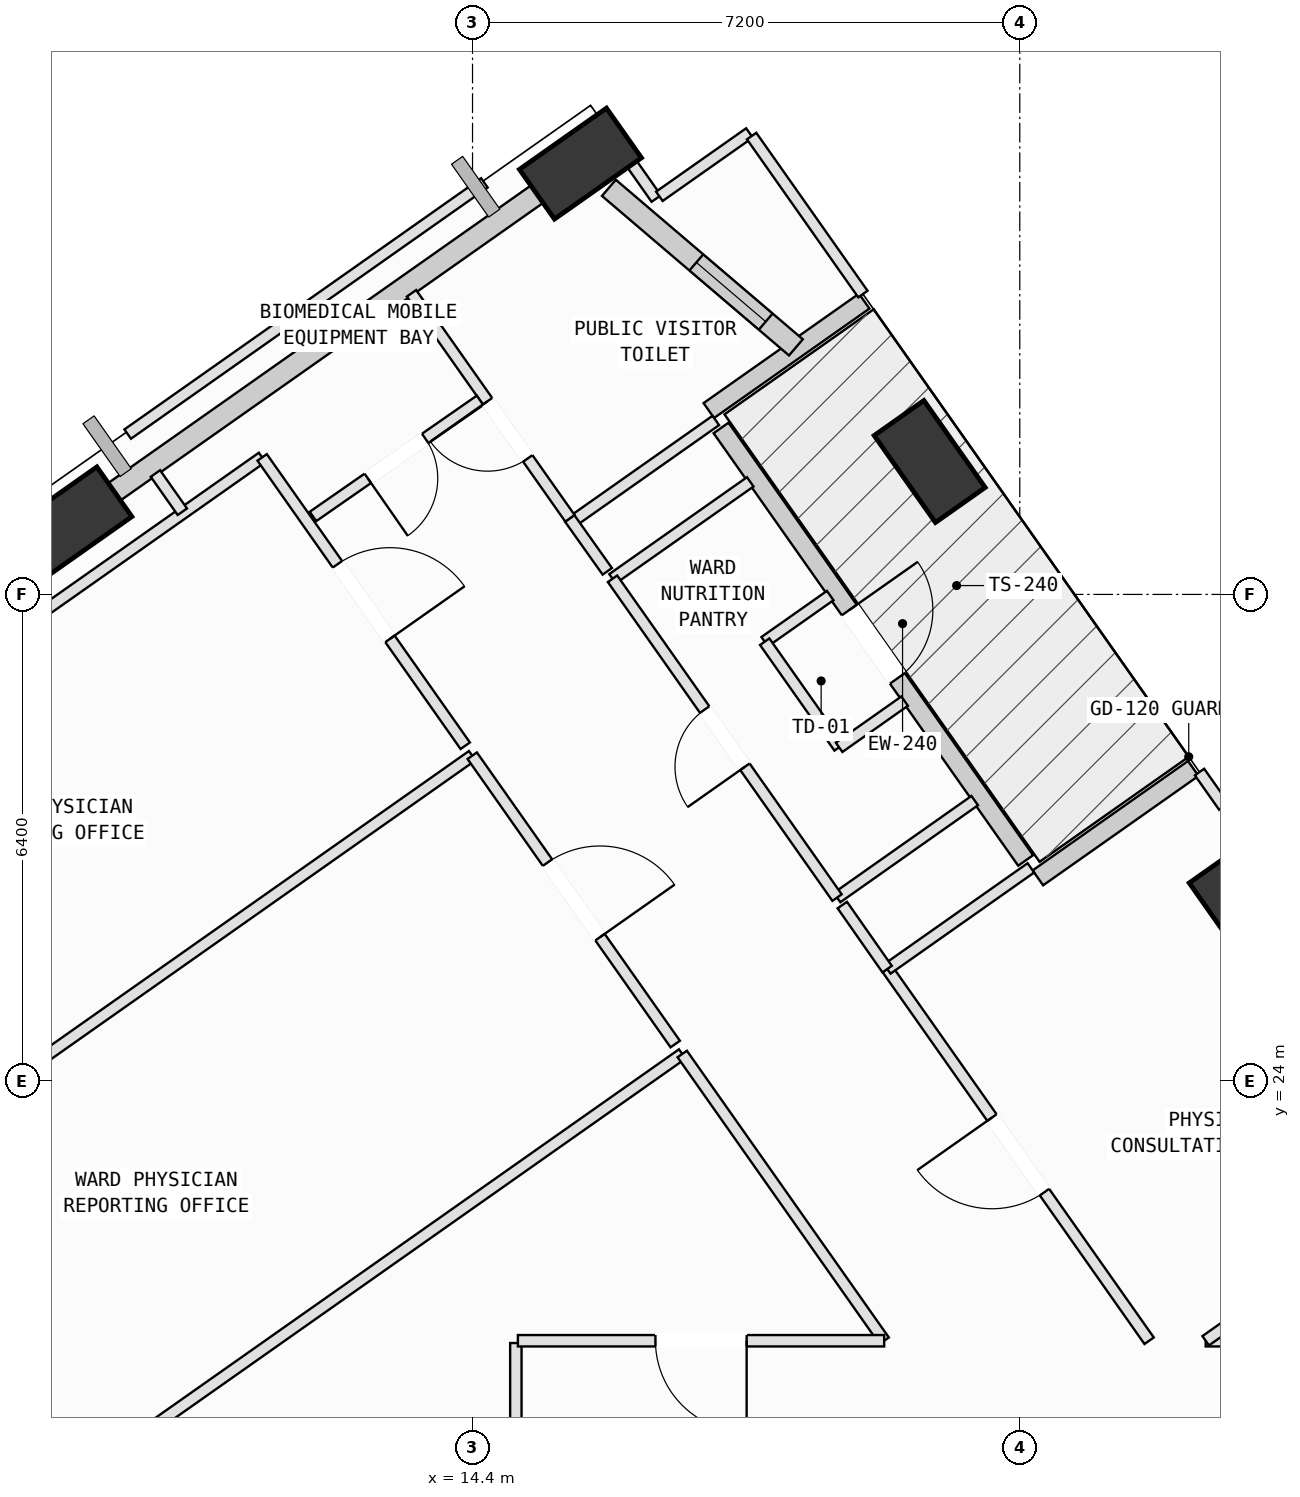
"""IFC4 building model, lengths in metres.
Left out: names, types, materials, properties, quantities, classifications, styles, units other than length and angle.
Written with IfcOpenShell. Run it as: python <this file> out.ifc"""

import sys

from ifc_helpers import new_model, si_unit, direction, frame, frame_2d, origin, origin_2d, place, context, subcontext, project, spatial, rectangle, extrude, element, fill, save


model = new_model("IFC4")
c1 = context("Model", 3, precision=1e-05, world=origin(), true_north=direction((0.0, 1.0)))
c2 = subcontext(c1, "Body", "Model", "MODEL_VIEW")
j1 = project(units=[si_unit("LENGTHUNIT", "METRE"), si_unit("PLANEANGLEUNIT", "RADIAN")], contexts=[c1])
p1 = place(None, origin())
s1 = spatial("IfcSite", under=j1, at=p1, CompositionType="ELEMENT")
p2 = place(p1, origin())
s2 = spatial("IfcBuilding", under=s1, at=p2, CompositionType="ELEMENT")
p3 = place(p2, frame((0.0, 0.0, 173.8)))
s3 = spatial("IfcBuildingStorey", under=s2, at=p3, CompositionType="ELEMENT", Elevation=173.8)
p4 = place(p3, frame((24.56, 26.262, 0.002), z_axis=(-0.005738432057, -0.037482949817, 0.999280790804), x_axis=(-0.445441829309, 0.894773866019, 0.031004925272)))
e1 = element("IfcColumn", 1, at=p4, inside=s3, PredefinedType="COLUMN", context=c2, shape_type="SweptSolid", body=[
    extrude(rectangle(XDim=1.4, YDim=0.8, at=origin_2d()), origin(), (0.0, 0.0, 1.0), 3.999),
])
p5 = place(p3, frame((20.415, 32.149, 0.002), z_axis=(-0.029937163226, -0.054813665459, 0.998047708447), x_axis=(-0.114112157003, 0.992154506101, 0.051067128835)))
e2 = element("IfcColumn", 2, at=p5, inside=s3, PredefinedType="COLUMN", context=c2, shape_type="SweptSolid", body=[
    extrude(rectangle(XDim=1.4, YDim=0.8, at=origin_2d()), origin(), (0.0, 0.0, 1.0), 4.004),
])
p6 = place(p3, frame((15.82, 36.069, 0.002), z_axis=(-0.045888334472, -0.073823010231, 0.996215049033), x_axis=(0.997206534803, 0.055450999468, 0.050043117453)))
e3 = element("IfcColumn", 3, at=p6, inside=s3, PredefinedType="COLUMN", context=c2, shape_type="SweptSolid", body=[
    extrude(rectangle(XDim=1.4, YDim=0.8, at=origin_2d()), origin(), (0.0, 0.0, 1.0), 4.011),
])
p7 = place(p3, frame((9.115, 31.348, 0.002), z_axis=(-0.026186113544, -0.101159812183, 0.99452550488), x_axis=(0.935042033919, 0.349395563353, 0.060159247944)))
e4 = element("IfcColumn", 4, at=p7, inside=s3, PredefinedType="COLUMN", context=c2, shape_type="SweptSolid", body=[
    extrude(rectangle(XDim=1.4, YDim=0.8, at=origin_2d()), origin(), (0.0, 0.0, 1.0), 4.018),
])
p8 = place(p3, frame((17.67, 32.59, 0.0), z_axis=(0.0, 0.0, 1.0), x_axis=(0.57573667461, -0.817635176292, 0.0)))
e5 = element("IfcWall", 5, at=p8, inside=s3, PredefinedType="SOLIDWALL", context=c2, shape_type="SweptSolid", body=[
    extrude(rectangle(XDim=6.96, YDim=0.24, at=frame_2d((3.48, 0.0))), origin(), (0.0, 0.0, 1.0), 3.265),
])
p9 = place(p8, frame((2.93, 0.0, 0.0)))
e6 = element("IfcOpeningElement", 6, at=p9, cuts=e5, PredefinedType="OPENING", context=c2, shape_type="SweptSolid", body=[
    extrude(rectangle(XDim=1.1, YDim=2.15, at=frame_2d((0.55, 1.075))), frame((0.0, 0.13, 0.0), z_axis=(0.0, -1.0, 0.0), x_axis=(1.0, 0.0, 0.0)), (0.0, 0.0, 1.0), 0.26),
])
for number, where, z_axis, x_axis in (
    (7, (21.838, 26.671, 0.0), (0.0, 0.0, 1.0), (0.818, 0.576, 0.0)),
    (8, (19.553, 34.259, 0.0), (0.0, 0.0, 1.0), (-0.818, -0.576, 0.0)),
):
    element("IfcWall", number, at=place(p3, frame(where, z_axis=z_axis, x_axis=x_axis)), inside=s3, PredefinedType="SOLIDWALL", context=c2, shape_type="SweptSolid", body=[
        extrude(rectangle(XDim=2.5, YDim=0.24, at=frame_2d((1.25, 0.0))), origin(), (0.0, 0.0, 1.0), 3.265),
    ])
p10 = place(p3, frame((16.194, 35.75, 0.0), z_axis=(0.0, 0.0, 1.0), x_axis=(0.760757212312, -0.649036565931, 0.0)))
e9 = element("IfcWall", 9, at=p10, inside=s3, PredefinedType="SOLIDWALL", context=c2, shape_type="SweptSolid", body=[
    extrude(rectangle(XDim=3.234, YDim=0.28, at=frame_2d((1.617, 0.0))), origin(), (0.0, 0.0, 1.0), 3.245),
])
p11 = place(p10, frame((1.512, 0.0, 0.75)))
e10 = element("IfcOpeningElement", 10, at=p11, cuts=e9, PredefinedType="OPENING", context=c2, shape_type="SweptSolid", body=[
    extrude(rectangle(XDim=1.2, YDim=1.75, at=frame_2d((0.6, 0.875))), frame((0.0, 0.15, 0.0), z_axis=(0.0, -1.0, 0.0), x_axis=(1.0, 0.0, 0.0)), (0.0, 0.0, 1.0), 0.3),
])
p12 = place(p3, frame((9.375, 31.531, 0.0), z_axis=(0.0, 0.0, 1.0), x_axis=(0.817661605139, 0.575699139726, 0.0)))
e11 = element("IfcWall", 11, at=p12, inside=s3, PredefinedType="SOLIDWALL", context=c2, shape_type="SweptSolid", body=[
    extrude(rectangle(XDim=7.23, YDim=0.28, at=frame_2d((3.615, 0.0))), origin(), (0.0, 0.0, 1.0), 3.265),
])
p13 = place(p3, frame((14.97, 20.55, 0.0), z_axis=(0.0, 0.0, 1.0), x_axis=(0.0, -1.0, 0.0)))
e12 = element("IfcWall", 12, at=p13, inside=s3, PredefinedType="PARTITIONING", context=c2, shape_type="SweptSolid", body=[
    extrude(rectangle(XDim=2.32, YDim=0.15, at=frame_2d((1.16, 0.0))), origin(), (0.0, 0.0, 1.0), 3.78),
])
p14 = place(p3, frame((6.01, 16.504, 0.0), z_axis=(0.0, 0.0, 1.0), x_axis=(0.817682801661, 0.575669033272, 0.0)))
e13 = element("IfcWall", 13, at=p14, inside=s3, PredefinedType="PARTITIONING", context=c2, shape_type="SweptSolid", body=[
    extrude(rectangle(XDim=13.635, YDim=0.15, at=frame_2d((6.817, 0.0))), origin(), (0.0, 0.0, 1.0), 3.78),
])
p15 = place(p3, frame((17.159, 24.353, 0.0), z_axis=(0.0, 0.0, 1.0), x_axis=(0.575775132448, -0.817608094905, 0.0)))
e14 = element("IfcWall", 14, at=p15, inside=s3, PredefinedType="PARTITIONING", context=c2, shape_type="SweptSolid", body=[
    extrude(rectangle(XDim=4.615, YDim=0.15, at=frame_2d((2.307, 0.0))), origin(), (0.0, 0.0, 1.0), 3.78),
])
p16 = place(p3, frame((19.816, 20.58, 0.0), z_axis=(0.0, 0.0, 1.0), x_axis=(-1.0, 0.0, 0.0)))
e15 = element("IfcWall", 15, at=p16, inside=s3, PredefinedType="PARTITIONING", context=c2, shape_type="SweptSolid", body=[
    extrude(rectangle(XDim=4.819, YDim=0.15, at=frame_2d((2.409, 0.0))), origin(), (0.0, 0.0, 1.0), 3.78),
])
p17 = place(p16, frame((1.81, 0.0, 0.0)))
e16 = element("IfcOpeningElement", 16, at=p17, cuts=e15, PredefinedType="OPENING", context=c2, shape_type="SweptSolid", body=[
    extrude(rectangle(XDim=1.2, YDim=2.15, at=frame_2d((0.6, 1.075))), frame((0.0, 0.085, 0.0), z_axis=(0.0, -1.0, 0.0), x_axis=(1.0, 0.0, 0.0)), (0.0, 0.0, 1.0), 0.17),
])
p18 = place(p3, frame((3.247, 20.428, 0.0), z_axis=(0.0, 0.0, 1.0), x_axis=(0.817649087701, 0.575716917749, 0.0)))
e17 = element("IfcWall", 17, at=p18, inside=s3, PredefinedType="PARTITIONING", context=c2, shape_type="SweptSolid", body=[
    extrude(rectangle(XDim=13.635, YDim=0.15, at=frame_2d((6.818, 0.0))), origin(), (0.0, 0.0, 1.0), 3.78),
])
p19 = place(p3, frame((14.396, 28.278, 0.0), z_axis=(0.0, 0.0, 1.0), x_axis=(0.575625036634, -0.817713774618, 0.0)))
e18 = element("IfcWall", 18, at=p19, inside=s3, PredefinedType="PARTITIONING", context=c2, shape_type="SweptSolid", body=[
    extrude(rectangle(XDim=4.64, YDim=0.15, at=frame_2d((2.32, 0.0))), origin(), (0.0, 0.0, 1.0), 3.78),
])
p20 = place(p19, frame((1.72, 0.0, 0.0)))
e19 = element("IfcOpeningElement", 19, at=p20, cuts=e18, PredefinedType="OPENING", context=c2, shape_type="SweptSolid", body=[
    extrude(rectangle(XDim=1.2, YDim=2.15, at=frame_2d((0.6, 1.075))), frame((0.0, 0.085, 0.0), z_axis=(0.0, -1.0, 0.0), x_axis=(1.0, 0.0, 0.0)), (0.0, 0.0, 1.0), 0.17),
])
p21 = place(p3, frame((2.525, 25.79, 0.0), z_axis=(0.0, 0.0, 1.0), x_axis=(0.817633687165, 0.575738789394, 0.0)))
e20 = element("IfcWall", 20, at=p21, inside=s3, PredefinedType="PARTITIONING", context=c2, shape_type="SweptSolid", body=[
    extrude(rectangle(XDim=11.138, YDim=0.15, at=frame_2d((5.569, 0.0))), origin(), (0.0, 0.0, 1.0), 3.265),
])
p22 = place(p3, frame((11.632, 32.203, 0.0), z_axis=(0.0, 0.0, 1.0), x_axis=(0.575790507785, -0.817597267085, 0.0)))
e21 = element("IfcWall", 21, at=p22, inside=s3, PredefinedType="PARTITIONING", context=c2, shape_type="SweptSolid", body=[
    extrude(rectangle(XDim=4.64, YDim=0.15, at=frame_2d((2.32, 0.0))), origin(), (0.0, 0.0, 1.0), 3.78),
])
p23 = place(p22, frame((1.72, 0.0, 0.0)))
e22 = element("IfcOpeningElement", 22, at=p23, cuts=e21, PredefinedType="OPENING", context=c2, shape_type="SweptSolid", body=[
    extrude(rectangle(XDim=1.2, YDim=2.15, at=frame_2d((0.6, 1.075))), frame((0.0, 0.085, 0.0), z_axis=(0.0, -1.0, 0.0), x_axis=(1.0, 0.0, 0.0)), (0.0, 0.0, 1.0), 0.17),
])
p24 = place(p3, frame((28.421, 20.579, 0.0), z_axis=(0.0, 0.0, 1.0), x_axis=(-0.999999975088, 0.00022321428, 0.0)))
e23 = element("IfcWall", 23, at=p24, inside=s3, PredefinedType="PARTITIONING", context=c2, shape_type="SweptSolid", body=[
    extrude(rectangle(XDim=4.375, YDim=0.15, at=frame_2d((2.188, 0.0))), origin(), (0.0, 0.0, 1.0), 3.78),
])
p25 = place(p24, frame((1.688, 0.0, 0.0)))
e24 = element("IfcOpeningElement", 24, at=p25, cuts=e23, PredefinedType="OPENING", context=c2, shape_type="SweptSolid", body=[
    extrude(rectangle(XDim=1.0, YDim=2.12, at=frame_2d((0.5, 1.06))), frame((0.0, 0.085, 0.0), z_axis=(0.0, -1.0, 0.0), x_axis=(1.0, 0.0, 0.0)), (0.0, 0.0, 1.0), 0.17),
])
p26 = place(p3, frame((24.046, 20.58, 0.0), z_axis=(0.0, 0.0, 1.0), x_axis=(0.817654070061, 0.575709841598, 0.0)))
e25 = element("IfcWall", 25, at=p26, inside=s3, PredefinedType="PARTITIONING", context=c2, shape_type="SweptSolid", body=[
    extrude(rectangle(XDim=3.576, YDim=0.15, at=frame_2d((1.788, 0.0))), origin(), (0.0, 0.0, 1.0), 3.78),
])
p27 = place(p3, frame((23.302, 20.58, 0.0), z_axis=(0.0, 0.0, 1.0), x_axis=(-0.575790528848, 0.817597252252, 0.0)))
e26 = element("IfcWall", 26, at=p27, inside=s3, PredefinedType="PARTITIONING", context=c2, shape_type="SweptSolid", body=[
    extrude(rectangle(XDim=5.983, YDim=0.15, at=frame_2d((2.992, 0.0))), origin(), (0.0, 0.0, 1.0), 3.78),
])
p28 = place(p27, frame((2.392, 0.0, 0.0)))
e27 = element("IfcOpeningElement", 27, at=p28, cuts=e26, PredefinedType="OPENING", context=c2, shape_type="SweptSolid", body=[
    extrude(rectangle(XDim=1.2, YDim=2.15, at=frame_2d((0.6, 1.075))), frame((0.0, 0.085, 0.0), z_axis=(0.0, -1.0, 0.0), x_axis=(1.0, 0.0, 0.0)), (0.0, 0.0, 1.0), 0.17),
])
p29 = place(p3, frame((19.857, 25.472, 0.0), z_axis=(0.0, 0.0, 1.0), x_axis=(0.817670092485, 0.575687085017, 0.0)))
e28 = element("IfcWall", 28, at=p29, inside=s3, PredefinedType="PARTITIONING", context=c2, shape_type="SweptSolid", body=[
    extrude(rectangle(XDim=2.31, YDim=0.15, at=frame_2d((1.155, 0.0))), origin(), (0.0, 0.0, 1.0), 3.78),
])
p30 = place(p3, frame((23.965, 28.063, 0.0), z_axis=(0.0, 0.0, 1.0), x_axis=(0.575679010769, -0.817675777164, 0.0)))
e29 = element("IfcWall", 29, at=p30, inside=s3, PredefinedType="PARTITIONING", context=c2, shape_type="SweptSolid", body=[
    extrude(rectangle(XDim=0.554, YDim=0.15, at=frame_2d((0.277, 0.0))), origin(), (0.0, 0.0, 1.0), 3.78),
])
p31 = place(p3, frame((16.242, 30.606, 0.0), z_axis=(0.0, 0.0, 1.0), x_axis=(0.817800657238, 0.575501594281, 0.0)))
e30 = element("IfcWall", 30, at=p31, inside=s3, PredefinedType="PARTITIONING", context=c2, shape_type="SweptSolid", body=[
    extrude(rectangle(XDim=2.216, YDim=0.15, at=frame_2d((1.108, 0.0))), origin(), (0.0, 0.0, 1.0), 3.78),
])
p32 = place(p3, frame((19.106, 30.385, 0.0), z_axis=(0.0, 0.0, 1.0), x_axis=(-0.817673191609, -0.575682683189, 0.0)))
e31 = element("IfcWall", 31, at=p32, inside=s3, PredefinedType="PARTITIONING", context=c2, shape_type="SweptSolid", body=[
    extrude(rectangle(XDim=1.054, YDim=0.15, at=frame_2d((0.527, 0.0))), origin(), (0.0, 0.0, 1.0), 3.78),
])
p33 = place(p3, frame((18.244, 29.778, 0.0), z_axis=(0.0, 0.0, 1.0), x_axis=(0.575792138405, -0.817596118723, 0.0)))
e32 = element("IfcWall", 32, at=p33, inside=s3, PredefinedType="PARTITIONING", context=c2, shape_type="SweptSolid", body=[
    extrude(rectangle(XDim=1.7, YDim=0.15, at=frame_2d((0.85, 0.0))), origin(), (0.0, 0.0, 1.0), 3.78),
])
p34 = place(p3, frame((19.223, 28.388, 0.0), z_axis=(0.0, 0.0, 1.0), x_axis=(0.817128165761, 0.576456035375, 0.0)))
e33 = element("IfcWall", 33, at=p34, inside=s3, PredefinedType="PARTITIONING", context=c2, shape_type="SweptSolid", body=[
    extrude(rectangle(XDim=1.055, YDim=0.15, at=frame_2d((0.527, 0.0))), origin(), (0.0, 0.0, 1.0), 3.78),
])
p35 = place(p3, frame((21.007, 27.687, 0.0), z_axis=(0.0, 0.0, 1.0), x_axis=(-0.817447055708, -0.576003742274, 0.0)))
e34 = element("IfcWall", 34, at=p35, inside=s3, PredefinedType="PARTITIONING", context=c2, shape_type="SweptSolid", body=[
    extrude(rectangle(XDim=2.216, YDim=0.15, at=frame_2d((1.108, 0.0))), origin(), (0.0, 0.0, 1.0), 3.78),
])
p36 = place(p3, frame((19.196, 26.411, 0.0), z_axis=(0.0, 0.0, 1.0), x_axis=(-0.575756218834, 0.817621413903, 0.0)))
e35 = element("IfcWall", 35, at=p36, inside=s3, PredefinedType="PARTITIONING", context=c2, shape_type="SweptSolid", body=[
    extrude(rectangle(XDim=5.131, YDim=0.15, at=frame_2d((2.565, 0.0))), origin(), (0.0, 0.0, 1.0), 3.78),
])
p37 = place(p36, frame((2.105, 0.0, 0.0)))
e36 = element("IfcOpeningElement", 36, at=p37, cuts=e35, PredefinedType="OPENING", context=c2, shape_type="SweptSolid", body=[
    extrude(rectangle(XDim=0.92, YDim=2.1, at=frame_2d((0.46, 1.05))), frame((0.0, 0.085, 0.0), z_axis=(0.0, -1.0, 0.0), x_axis=(1.0, 0.0, 0.0)), (0.0, 0.0, 1.0), 0.17),
])
p38 = place(p3, frame((17.601, 32.689, 0.0), z_axis=(0.0, 0.0, 1.0), x_axis=(-0.817670092485, -0.575687085017, 0.0)))
e37 = element("IfcWall", 37, at=p38, inside=s3, PredefinedType="PARTITIONING", context=c2, shape_type="SweptSolid", body=[
    extrude(rectangle(XDim=2.31, YDim=0.15, at=frame_2d((1.155, 0.0))), origin(), (0.0, 0.0, 1.0), 3.78),
])
p39 = place(p3, frame((15.683, 31.4, 0.0), z_axis=(0.0, 0.0, 1.0), x_axis=(-0.575807168993, 0.817585533223, 0.0)))
e38 = element("IfcWall", 38, at=p39, inside=s3, PredefinedType="PARTITIONING", context=c2, shape_type="SweptSolid", body=[
    extrude(rectangle(XDim=3.623, YDim=0.15, at=frame_2d((1.812, 0.0))), origin(), (0.0, 0.0, 1.0), 3.78),
])
p40 = place(p39, frame((0.966, 0.0, 0.0)))
e39 = element("IfcOpeningElement", 39, at=p40, cuts=e38, PredefinedType="OPENING", context=c2, shape_type="SweptSolid", body=[
    extrude(rectangle(XDim=0.92, YDim=2.1, at=frame_2d((0.46, 1.05))), frame((0.0, 0.085, 0.0), z_axis=(0.0, -1.0, 0.0), x_axis=(1.0, 0.0, 0.0)), (0.0, 0.0, 1.0), 0.17),
])
p41 = place(p3, frame((15.177, 35.849, 0.0), z_axis=(0.0, 0.0, 1.0), x_axis=(0.817990358768, 0.575231929714, 0.0)))
e40 = element("IfcWall", 40, at=p41, inside=s3, PredefinedType="PARTITIONING", context=c2, shape_type="SweptSolid", body=[
    extrude(rectangle(XDim=1.203, YDim=0.15, at=frame_2d((0.602, 0.0))), origin(), (0.0, 0.0, 1.0), 3.265),
])
p42 = place(p3, frame((16.19, 36.5, 0.0), z_axis=(0.0, 0.0, 1.0), x_axis=(0.575415698036, -0.817861097286, 0.0)))
e41 = element("IfcWall", 41, at=p42, inside=s3, PredefinedType="PARTITIONING", context=c2, shape_type="SweptSolid", body=[
    extrude(rectangle(XDim=1.09, YDim=0.15, at=frame_2d((0.545, 0.0))), origin(), (0.0, 0.0, 1.0), 3.78),
])
p43 = place(p3, frame((16.858, 35.638, 0.0), z_axis=(0.0, 0.0, 1.0), x_axis=(0.817788798356, 0.57551844565, 0.0)))
e42 = element("IfcWall", 42, at=p43, inside=s3, PredefinedType="PARTITIONING", context=c2, shape_type="SweptSolid", body=[
    extrude(rectangle(XDim=1.449, YDim=0.15, at=frame_2d((0.725, 0.0))), origin(), (0.0, 0.0, 1.0), 3.78),
])
p44 = place(p3, frame((18.072, 36.431, 0.0), z_axis=(0.0, 0.0, 1.0), x_axis=(0.57574788064, -0.817627285466, 0.0)))
e43 = element("IfcWall", 43, at=p44, inside=s3, PredefinedType="PARTITIONING", context=c2, shape_type="SweptSolid", body=[
    extrude(rectangle(XDim=2.542, YDim=0.15, at=frame_2d((1.271, 0.0))), origin(), (0.0, 0.0, 1.0), 3.78),
])
p45 = place(p3, frame((14.499, 32.954, 0.0), z_axis=(0.0, 0.0, 1.0), x_axis=(-0.821074321589, -0.570821301658, 0.0)))
e44 = element("IfcWall", 44, at=p45, inside=s3, PredefinedType="PARTITIONING", context=c2, shape_type="SweptSolid", body=[
    extrude(rectangle(XDim=2.677, YDim=0.15, at=frame_2d((1.338, 0.0))), origin(), (0.0, 0.0, 1.0), 3.78),
])
p46 = place(p45, frame((0.878, 0.0, 0.0)))
e45 = element("IfcOpeningElement", 45, at=p46, cuts=e44, PredefinedType="OPENING", context=c2, shape_type="SweptSolid", body=[
    extrude(rectangle(XDim=0.92, YDim=2.1, at=frame_2d((0.46, 1.05))), frame((0.0, 0.085, 0.0), z_axis=(0.0, -1.0, 0.0), x_axis=(1.0, 0.0, 0.0)), (0.0, 0.0, 1.0), 0.17),
])
p47 = place(p3, frame((10.582, 31.488, 0.0), z_axis=(0.0, 0.0, 1.0), x_axis=(-0.57559173151, 0.817737218559, 0.0)))
e46 = element("IfcWall", 46, at=p47, inside=s3, PredefinedType="PARTITIONING", context=c2, shape_type="SweptSolid", body=[
    extrude(rectangle(XDim=0.615, YDim=0.15, at=frame_2d((0.308, 0.0))), origin(), (0.0, 0.0, 1.0), 3.78),
])
p48 = place(p3, frame((9.863, 32.51, 0.0), z_axis=(0.0, 0.0, 1.0), x_axis=(0.817598024739, 0.575789431948, 0.0)))
e47 = element("IfcWall", 47, at=p48, inside=s3, PredefinedType="PARTITIONING", context=c2, shape_type="SweptSolid", body=[
    extrude(rectangle(XDim=5.74, YDim=0.15, at=frame_2d((2.87, 0.0))), origin(), (0.0, 0.0, 1.0), 3.78),
])
p49 = place(p3, frame((15.68, 31.398, 0.0), z_axis=(0.0, 0.0, 1.0), x_axis=(0.579337524754, -0.815087745223, 0.0)))
e48 = element("IfcWall", 48, at=p49, inside=s3, PredefinedType="PARTITIONING", context=c2, shape_type="SweptSolid", body=[
    extrude(rectangle(XDim=0.851, YDim=0.15, at=frame_2d((0.426, 0.0))), origin(), (0.0, 0.0, 1.0), 3.78),
])
p50 = place(p3, frame((19.265, 26.313, 0.0), z_axis=(0.0, 0.0, 1.0), x_axis=(0.57344642107, -0.819243066593, 0.0)))
e49 = element("IfcWall", 49, at=p50, inside=s3, PredefinedType="PARTITIONING", context=c2, shape_type="SweptSolid", body=[
    extrude(rectangle(XDim=1.029, YDim=0.15, at=frame_2d((0.515, 0.0))), origin(), (0.0, 0.0, 1.0), 3.78),
])
p51 = place(p9, origin())
e50 = element("IfcDoor", 50, at=p51, inside=s3, OperationType="SINGLE_SWING_LEFT", PredefinedType="DOOR", context=c2, shape_type="SweptSolid", body=[
    extrude(rectangle(XDim=1.1, YDim=2.15, at=frame_2d((0.55, 1.075))), frame((0.0, 0.025, 0.0), z_axis=(0.0, -1.0, 0.0), x_axis=(1.0, 0.0, 0.0)), (0.0, 0.0, 1.0), 0.05),
])
fill(e6, e50)
p52 = place(p11, origin())
e51 = element("IfcWindow", 51, at=p52, inside=s3, PartitioningType="SINGLE_PANEL", PredefinedType="WINDOW", context=c2, shape_type="SweptSolid", body=[
    extrude(rectangle(XDim=1.2, YDim=1.75, at=frame_2d((0.6, 0.875))), frame((0.0, 0.03, 0.0), z_axis=(0.0, -1.0, 0.0), x_axis=(1.0, 0.0, 0.0)), (0.0, 0.0, 1.0), 0.06),
])
fill(e10, e51)
p53 = place(p17, origin())
e52 = element("IfcDoor", 52, at=p53, inside=s3, OperationType="SINGLE_SWING_LEFT", PredefinedType="DOOR", context=c2, shape_type="SweptSolid", body=[
    extrude(rectangle(XDim=1.2, YDim=2.15, at=frame_2d((0.6, 1.075))), frame((0.0, 0.025, 0.0), z_axis=(0.0, -1.0, 0.0), x_axis=(1.0, 0.0, 0.0)), (0.0, 0.0, 1.0), 0.05),
])
fill(e16, e52)
p54 = place(p20, origin())
e53 = element("IfcDoor", 53, at=p54, inside=s3, OperationType="SINGLE_SWING_RIGHT", PredefinedType="DOOR", context=c2, shape_type="SweptSolid", body=[
    extrude(rectangle(XDim=1.2, YDim=2.15, at=frame_2d((0.6, 1.075))), frame((0.0, 0.025, 0.0), z_axis=(0.0, -1.0, 0.0), x_axis=(1.0, 0.0, 0.0)), (0.0, 0.0, 1.0), 0.05),
])
fill(e19, e53)
p55 = place(p23, origin())
e54 = element("IfcDoor", 54, at=p55, inside=s3, OperationType="SINGLE_SWING_RIGHT", PredefinedType="DOOR", context=c2, shape_type="SweptSolid", body=[
    extrude(rectangle(XDim=1.2, YDim=2.15, at=frame_2d((0.6, 1.075))), frame((0.0, 0.025, 0.0), z_axis=(0.0, -1.0, 0.0), x_axis=(1.0, 0.0, 0.0)), (0.0, 0.0, 1.0), 0.05),
])
fill(e22, e54)
p56 = place(p28, origin())
e55 = element("IfcDoor", 55, at=p56, inside=s3, OperationType="SINGLE_SWING_RIGHT", PredefinedType="DOOR", context=c2, shape_type="SweptSolid", body=[
    extrude(rectangle(XDim=1.2, YDim=2.15, at=frame_2d((0.6, 1.075))), frame((0.0, 0.025, 0.0), z_axis=(0.0, -1.0, 0.0), x_axis=(1.0, 0.0, 0.0)), (0.0, 0.0, 1.0), 0.05),
])
fill(e27, e55)
p57 = place(p37, origin())
e56 = element("IfcDoor", 56, at=p57, inside=s3, OperationType="SINGLE_SWING_LEFT", PredefinedType="DOOR", context=c2, shape_type="SweptSolid", body=[
    extrude(rectangle(XDim=0.92, YDim=2.1, at=frame_2d((0.46, 1.05))), frame((0.0, 0.025, 0.0), z_axis=(0.0, -1.0, 0.0), x_axis=(1.0, 0.0, 0.0)), (0.0, 0.0, 1.0), 0.05),
])
fill(e36, e56)
p58 = place(p40, origin())
e57 = element("IfcDoor", 57, at=p58, inside=s3, OperationType="SINGLE_SWING_RIGHT", PredefinedType="DOOR", context=c2, shape_type="SweptSolid", body=[
    extrude(rectangle(XDim=0.92, YDim=2.1, at=frame_2d((0.46, 1.05))), frame((0.0, 0.025, 0.0), z_axis=(0.0, -1.0, 0.0), x_axis=(1.0, 0.0, 0.0)), (0.0, 0.0, 1.0), 0.05),
])
fill(e39, e57)
p59 = place(p46, origin())
e58 = element("IfcDoor", 58, at=p59, inside=s3, OperationType="SINGLE_SWING_RIGHT", PredefinedType="DOOR", context=c2, shape_type="SweptSolid", body=[
    extrude(rectangle(XDim=0.92, YDim=2.1, at=frame_2d((0.46, 1.05))), frame((0.0, 0.025, 0.0), z_axis=(0.0, -1.0, 0.0), x_axis=(1.0, 0.0, 0.0)), (0.0, 0.0, 1.0), 0.05),
])
fill(e45, e58)
save(model, sys.argv[1])
